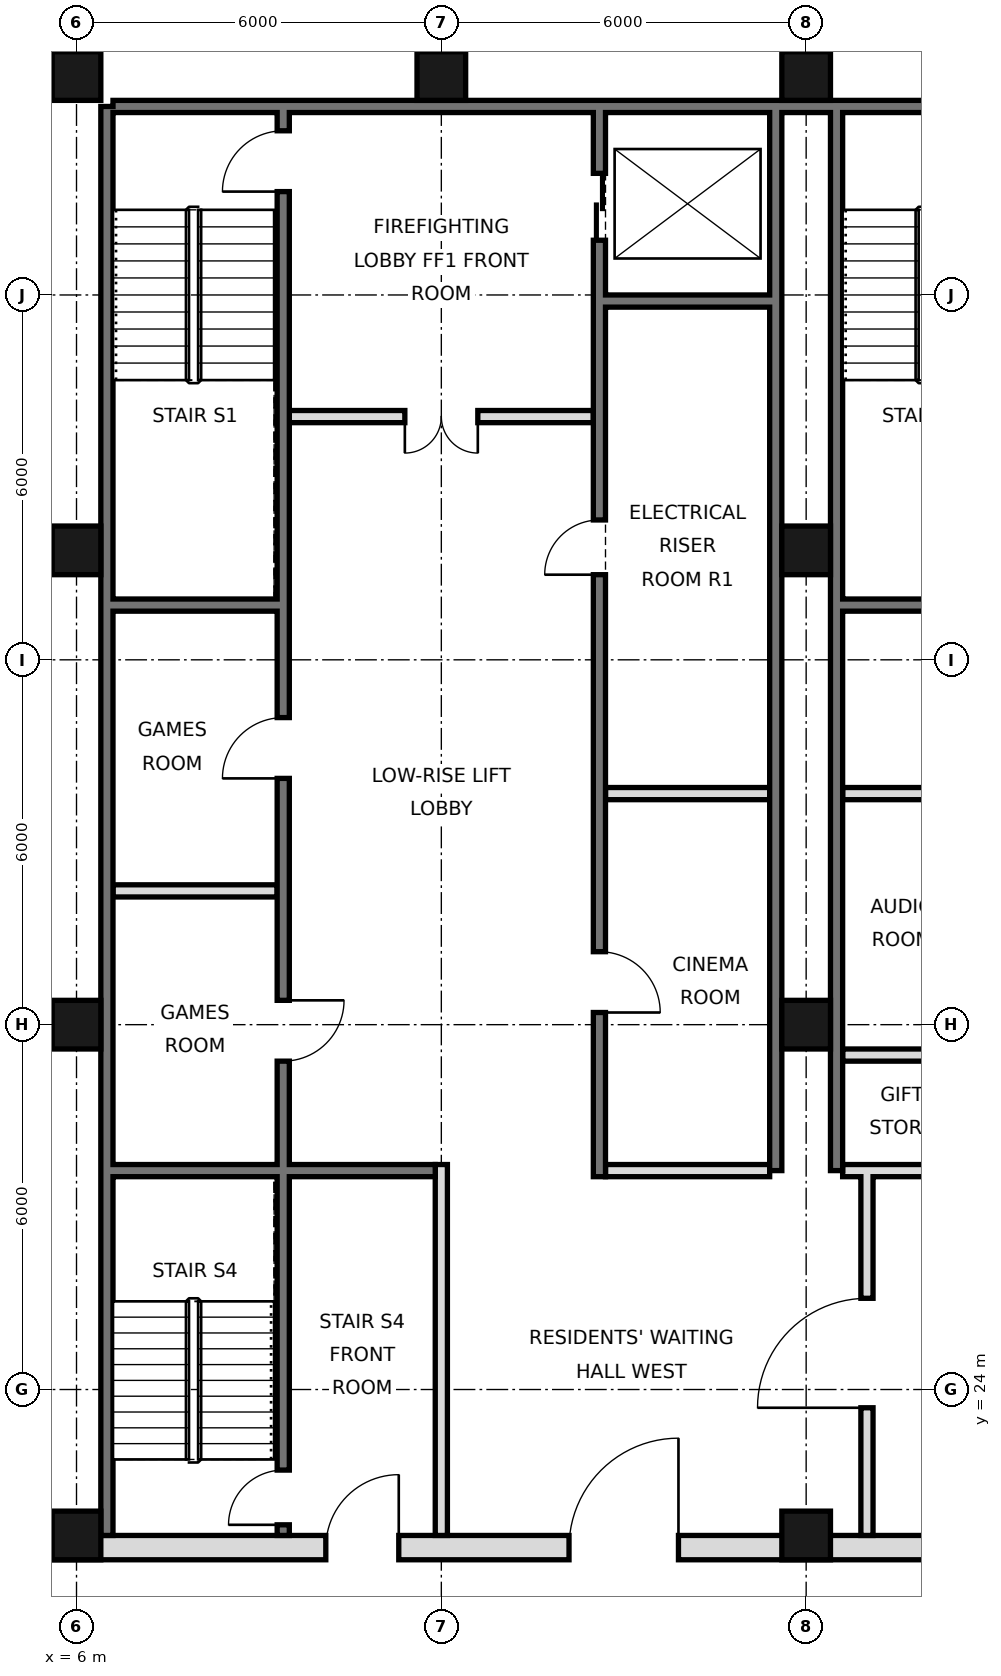
"""IFC4 building model, lengths in metres.
Left out: names, types, materials, properties, quantities, classifications, styles, units other than length and angle.
Written with IfcOpenShell. Run it as: python <this file> out.ifc"""

import sys

from ifc_helpers import new_model, si_unit, direction, frame, frame_2d, origin, origin_2d, place, context, subcontext, project, spatial, rectangle, hollow_rectangle, extrude, element, fill, save


model = new_model("IFC4")
c1 = context("Model", 3, precision=1e-05, world=origin(), true_north=direction((0.0, 1.0)))
c2 = subcontext(c1, "Body", "Model", "MODEL_VIEW")
j1 = project(units=[si_unit("LENGTHUNIT", "METRE"), si_unit("PLANEANGLEUNIT", "RADIAN")], contexts=[c1])
p1 = place(None, origin())
s1 = spatial("IfcSite", under=j1, at=p1, CompositionType="ELEMENT")
p2 = place(p1, origin())
s2 = spatial("IfcBuilding", under=s1, at=p2, CompositionType="ELEMENT")
p3 = place(p2, frame((0.0, 0.0, 312.4)))
s3 = spatial("IfcBuildingStorey", under=s2, at=p3, CompositionType="ELEMENT", Elevation=312.4)
for number, where, z_axis, x_axis in (
    (1, (6.0, 21.6, 0.0), (0.0, 0.0, 1.0), (1.0, 0.0, 0.0)),
    (2, (6.0, 30.0, 0.0), (0.0, 0.0, 1.0), (1.0, 0.0, 0.0)),
    (3, (6.0, 37.8, 0.0), (0.0, 0.0, 1.0), (1.0, 0.0, 0.0)),
    (4, (6.0, 45.6, 0.0), (0.0, 0.0, 1.0), (1.0, 0.0, 0.0)),
    (5, (12.0, 45.6, 0.0), (0.0, 0.0, 1.0), (1.0, 0.0, 0.0)),
    (6, (18.0, 21.6, 0.0), (0.0, 0.0, 1.0), (1.0, 0.0, 0.0)),
    (7, (18.0, 30.0, 0.0), (0.0, 0.0, 1.0), (1.0, 0.0, 0.0)),
    (8, (18.0, 37.8, 0.0), (0.0, 0.0, 1.0), (1.0, 0.0, 0.0)),
    (9, (18.0, 45.6, 0.0), (0.0, 0.0, 1.0), (1.0, 0.0, 0.0)),
):
    element("IfcColumn", number, at=place(p3, frame(where, z_axis=z_axis, x_axis=x_axis)), inside=s3, PredefinedType="COLUMN", context=c2, shape_type="SweptSolid", body=[
        extrude(hollow_rectangle(XDim=0.8, YDim=0.8, WallThickness=0.025, at=origin_2d()), origin(), (0.0, 0.0, 1.0), 3.6),
    ])
p4 = place(p3, frame((6.5, 21.6, 0.0), z_axis=(0.0, 0.0, 1.0), x_axis=(0.0, 1.0, 0.0)))
e10 = element("IfcWall", 10, at=p4, inside=s3, PredefinedType="SOLIDWALL", context=c2, shape_type="SweptSolid", body=[
    extrude(rectangle(XDim=23.5, YDim=0.2, at=frame_2d((11.75, 0.0))), origin(), (0.0, 0.0, 1.0), 3.42),
])
p5 = place(p3, frame((6.6, 45.1, 0.0), z_axis=(0.0, 0.0, 1.0), x_axis=(1.0, 0.0, 0.0)))
e11 = element("IfcWall", 11, at=p5, inside=s3, PredefinedType="SOLIDWALL", context=c2, shape_type="SweptSolid", body=[
    extrude(rectangle(XDim=34.8, YDim=0.2, at=frame_2d((17.4, 0.0))), origin(), (0.0, 0.0, 1.0), 3.42),
])
for number, where, z_axis, x_axis in (
    (12, (17.5, 27.6, 0.0), (0.0, 0.0, 1.0), (0.0, 1.0, 0.0)),
    (13, (18.5, 27.6, 0.0), (0.0, 0.0, 1.0), (0.0, 1.0, 0.0)),
):
    element("IfcWall", number, at=place(p3, frame(where, z_axis=z_axis, x_axis=x_axis)), inside=s3, PredefinedType="SOLIDWALL", context=c2, shape_type="SweptSolid", body=[
        extrude(rectangle(XDim=17.5, YDim=0.2, at=frame_2d((8.75, 0.0))), origin(), (0.0, 0.0, 1.0), 3.42),
    ])
p6 = place(p3, frame((5.6, 21.4, 0.0), z_axis=(0.0, 0.0, 1.0), x_axis=(1.0, 0.0, 0.0)))
e14 = element("IfcWall", 14, at=p6, inside=s3, PredefinedType="SOLIDWALL", context=c2, shape_type="SweptSolid", body=[
    extrude(rectangle(XDim=36.8, YDim=0.4, at=frame_2d((18.4, 0.0))), origin(), (0.0, 0.0, 1.0), 3.42),
])
p7 = place(p6, frame((8.5, 0.0, 0.0)))
e15 = element("IfcOpeningElement", 15, at=p7, cuts=e14, PredefinedType="OPENING", context=c2, shape_type="SweptSolid", body=[
    extrude(rectangle(XDim=1.8, YDim=2.1, at=frame_2d((0.9, 1.05))), frame((0.0, 0.21, 0.0), z_axis=(0.0, -1.0, 0.0), x_axis=(1.0, 0.0, 0.0)), (0.0, 0.0, 1.0), 0.42),
])
p8 = place(p6, frame((17.5, 0.0, 0.0)))
e16 = element("IfcOpeningElement", 16, at=p8, cuts=e14, PredefinedType="OPENING", context=c2, shape_type="SweptSolid", body=[
    extrude(rectangle(XDim=1.8, YDim=2.1, at=frame_2d((0.9, 1.05))), frame((0.0, 0.21, 0.0), z_axis=(0.0, -1.0, 0.0), x_axis=(1.0, 0.0, 0.0)), (0.0, 0.0, 1.0), 0.42),
])
p9 = place(p6, frame((26.5, 0.0, 0.0)))
e17 = element("IfcOpeningElement", 17, at=p9, cuts=e14, PredefinedType="OPENING", context=c2, shape_type="SweptSolid", body=[
    extrude(rectangle(XDim=1.8, YDim=2.1, at=frame_2d((0.9, 1.05))), frame((0.0, 0.21, 0.0), z_axis=(0.0, -1.0, 0.0), x_axis=(1.0, 0.0, 0.0)), (0.0, 0.0, 1.0), 0.42),
])
p10 = place(p6, frame((4.5, 0.0, 0.0)))
e18 = element("IfcOpeningElement", 18, at=p10, cuts=e14, PredefinedType="OPENING", context=c2, shape_type="SweptSolid", body=[
    extrude(rectangle(XDim=1.2, YDim=2.1, at=frame_2d((0.6, 1.05))), frame((0.0, 0.21, 0.0), z_axis=(0.0, -1.0, 0.0), x_axis=(1.0, 0.0, 0.0)), (0.0, 0.0, 1.0), 0.42),
])
p11 = place(p6, frame((31.1, 0.0, 0.0)))
e19 = element("IfcOpeningElement", 19, at=p11, cuts=e14, PredefinedType="OPENING", context=c2, shape_type="SweptSolid", body=[
    extrude(rectangle(XDim=1.2, YDim=2.1, at=frame_2d((0.6, 1.05))), frame((0.0, 0.21, 0.0), z_axis=(0.0, -1.0, 0.0), x_axis=(1.0, 0.0, 0.0)), (0.0, 0.0, 1.0), 0.42),
])
p12 = place(p3, frame((19.0, 21.6, 0.0), z_axis=(0.0, 0.0, 1.0), x_axis=(0.0, 1.0, 0.0)))
e20 = element("IfcWall", 20, at=p12, inside=s3, PredefinedType="PARTITIONING", context=c2, shape_type="SweptSolid", body=[
    extrude(rectangle(XDim=6.0, YDim=0.2, at=frame_2d((3.0, 0.0))), origin(), (0.0, 0.0, 1.0), 3.42),
])
p13 = place(p12, frame((2.1, 0.0, 0.0)))
e21 = element("IfcOpeningElement", 21, at=p13, cuts=e20, PredefinedType="OPENING", context=c2, shape_type="SweptSolid", body=[
    extrude(rectangle(XDim=1.8, YDim=2.1, at=frame_2d((0.9, 1.05))), frame((0.0, 0.11, 0.0), z_axis=(0.0, -1.0, 0.0), x_axis=(1.0, 0.0, 0.0)), (0.0, 0.0, 1.0), 0.22),
])
p14 = place(p3, frame((12.0, 21.6, 0.0), z_axis=(0.0, 0.0, 1.0), x_axis=(0.0, 1.0, 0.0)))
e22 = element("IfcWall", 22, at=p14, inside=s3, PredefinedType="PARTITIONING", context=c2, shape_type="SweptSolid", body=[
    extrude(rectangle(XDim=6.1, YDim=0.2, at=frame_2d((3.05, 0.0))), origin(), (0.0, 0.0, 1.0), 3.42),
])
p15 = place(p3, frame((14.6, 27.5, 0.0), z_axis=(0.0, 0.0, 1.0), x_axis=(0.0, 1.0, 0.0)))
e23 = element("IfcWall", 23, at=p15, inside=s3, PredefinedType="SOLIDWALL", context=c2, shape_type="SweptSolid", body=[
    extrude(rectangle(XDim=17.5, YDim=0.2, at=frame_2d((8.75, 0.0))), origin(), (0.0, 0.0, 1.0), 3.42),
])
p16 = place(p15, frame((15.4, 0.0, 0.0)))
e24 = element("IfcOpeningElement", 24, at=p16, cuts=e23, PredefinedType="OPENING", context=c2, shape_type="SweptSolid", body=[
    extrude(rectangle(XDim=1.1, YDim=2.1, at=frame_2d((0.55, 1.05))), frame((0.0, 0.11, 0.0), z_axis=(0.0, -1.0, 0.0), x_axis=(1.0, 0.0, 0.0)), (0.0, 0.0, 1.0), 0.22),
])
p17 = place(p15, frame((2.7, 0.0, 0.0)))
e25 = element("IfcOpeningElement", 25, at=p17, cuts=e23, PredefinedType="OPENING", context=c2, shape_type="SweptSolid", body=[
    extrude(rectangle(XDim=1.0, YDim=2.1, at=frame_2d((0.5, 1.05))), frame((0.0, 0.11, 0.0), z_axis=(0.0, -1.0, 0.0), x_axis=(1.0, 0.0, 0.0)), (0.0, 0.0, 1.0), 0.22),
])
p18 = place(p15, frame((9.9, 0.0, 0.0)))
e26 = element("IfcOpeningElement", 26, at=p18, cuts=e23, PredefinedType="OPENING", context=c2, shape_type="SweptSolid", body=[
    extrude(rectangle(XDim=0.9, YDim=2.1, at=frame_2d((0.45, 1.05))), frame((0.0, 0.11, 0.0), z_axis=(0.0, -1.0, 0.0), x_axis=(1.0, 0.0, 0.0)), (0.0, 0.0, 1.0), 0.22),
])
p19 = place(p3, frame((9.4, 21.6, 0.0), z_axis=(0.0, 0.0, 1.0), x_axis=(0.0, 1.0, 0.0)))
e27 = element("IfcWall", 27, at=p19, inside=s3, PredefinedType="SOLIDWALL", context=c2, shape_type="SweptSolid", body=[
    extrude(rectangle(XDim=23.4, YDim=0.2, at=frame_2d((11.7, 0.0))), origin(), (0.0, 0.0, 1.0), 3.42),
])
p20 = place(p19, frame((7.8, 0.0, 0.0)))
e28 = element("IfcOpeningElement", 28, at=p20, cuts=e27, PredefinedType="OPENING", context=c2, shape_type="SweptSolid", body=[
    extrude(rectangle(XDim=1.0, YDim=2.1, at=frame_2d((0.5, 1.05))), frame((0.0, 0.11, 0.0), z_axis=(0.0, -1.0, 0.0), x_axis=(1.0, 0.0, 0.0)), (0.0, 0.0, 1.0), 0.22),
])
p21 = place(p19, frame((12.45, 0.0, 0.0)))
e29 = element("IfcOpeningElement", 29, at=p21, cuts=e27, PredefinedType="OPENING", context=c2, shape_type="SweptSolid", body=[
    extrude(rectangle(XDim=1.0, YDim=2.1, at=frame_2d((0.5, 1.05))), frame((0.0, 0.11, 0.0), z_axis=(0.0, -1.0, 0.0), x_axis=(1.0, 0.0, 0.0)), (0.0, 0.0, 1.0), 0.22),
])
p22 = place(p19, frame((22.1, 0.0, 0.0)))
e30 = element("IfcOpeningElement", 30, at=p22, cuts=e27, PredefinedType="OPENING", context=c2, shape_type="SweptSolid", body=[
    extrude(rectangle(XDim=1.0, YDim=2.1, at=frame_2d((0.5, 1.05))), frame((0.0, 0.11, 0.0), z_axis=(0.0, -1.0, 0.0), x_axis=(1.0, 0.0, 0.0)), (0.0, 0.0, 1.0), 0.22),
])
p23 = place(p19, frame((0.175, 0.0, 0.0)))
e31 = element("IfcOpeningElement", 31, at=p23, cuts=e27, PredefinedType="OPENING", context=c2, shape_type="SweptSolid", body=[
    extrude(rectangle(XDim=0.9, YDim=2.1, at=frame_2d((0.45, 1.05))), frame((0.0, 0.11, 0.0), z_axis=(0.0, -1.0, 0.0), x_axis=(1.0, 0.0, 0.0)), (0.0, 0.0, 1.0), 0.22),
])
for number, where, z_axis, x_axis in (
    (32, (14.7, 27.6, 0.0), (0.0, 0.0, 1.0), (1.0, 0.0, 0.0)),
    (33, (18.6, 27.6, 0.0), (0.0, 0.0, 1.0), (1.0, 0.0, 0.0)),
):
    element("IfcWall", number, at=place(p3, frame(where, z_axis=z_axis, x_axis=x_axis)), inside=s3, PredefinedType="PARTITIONING", context=c2, shape_type="SweptSolid", body=[
        extrude(rectangle(XDim=2.7, YDim=0.2, at=frame_2d((1.35, 0.0))), origin(), (0.0, 0.0, 1.0), 3.42),
    ])
p24 = place(p3, frame((6.6, 27.6, 0.0), z_axis=(0.0, 0.0, 1.0), x_axis=(1.0, 0.0, 0.0)))
e34 = element("IfcWall", 34, at=p24, inside=s3, PredefinedType="SOLIDWALL", context=c2, shape_type="SweptSolid", body=[
    extrude(rectangle(XDim=5.3, YDim=0.2, at=frame_2d((2.65, 0.0))), origin(), (0.0, 0.0, 1.0), 3.42),
])
for number, where, z_axis, x_axis in (
    (35, (18.6, 29.5, 0.0), (0.0, 0.0, 1.0), (1.0, 0.0, 0.0)),
    (36, (6.6, 32.2, 0.0), (0.0, 0.0, 1.0), (1.0, 0.0, 0.0)),
):
    element("IfcWall", number, at=place(p3, frame(where, z_axis=z_axis, x_axis=x_axis)), inside=s3, PredefinedType="PARTITIONING", context=c2, shape_type="SweptSolid", body=[
        extrude(rectangle(XDim=2.7, YDim=0.2, at=frame_2d((1.35, 0.0))), origin(), (0.0, 0.0, 1.0), 3.42),
    ])
for number, where, z_axis, x_axis in (
    (37, (14.7, 33.8, 0.0), (0.0, 0.0, 1.0), (1.0, 0.0, 0.0)),
    (38, (18.6, 33.8, 0.0), (0.0, 0.0, 1.0), (1.0, 0.0, 0.0)),
    (39, (18.6, 36.9, 0.0), (0.0, 0.0, 1.0), (1.0, 0.0, 0.0)),
    (40, (6.6, 36.9, 0.0), (0.0, 0.0, 1.0), (1.0, 0.0, 0.0)),
):
    element("IfcWall", number, at=place(p3, frame(where, z_axis=z_axis, x_axis=x_axis)), inside=s3, PredefinedType="SOLIDWALL", context=c2, shape_type="SweptSolid", body=[
        extrude(rectangle(XDim=2.7, YDim=0.2, at=frame_2d((1.35, 0.0))), origin(), (0.0, 0.0, 1.0), 3.42),
    ])
p25 = place(p3, frame((9.5, 40.0, 0.0), z_axis=(0.0, 0.0, 1.0), x_axis=(1.0, 0.0, 0.0)))
e41 = element("IfcWall", 41, at=p25, inside=s3, PredefinedType="PARTITIONING", context=c2, shape_type="SweptSolid", body=[
    extrude(rectangle(XDim=5.0, YDim=0.2, at=frame_2d((2.5, 0.0))), origin(), (0.0, 0.0, 1.0), 3.42),
])
p26 = place(p25, frame((1.9, 0.0, 0.0)))
e42 = element("IfcOpeningElement", 42, at=p26, cuts=e41, PredefinedType="OPENING", context=c2, shape_type="SweptSolid", body=[
    extrude(rectangle(XDim=1.2, YDim=2.1, at=frame_2d((0.6, 1.05))), frame((0.0, 0.11, 0.0), z_axis=(0.0, -1.0, 0.0), x_axis=(1.0, 0.0, 0.0)), (0.0, 0.0, 1.0), 0.22),
])
p27 = place(p3, frame((14.7, 41.9, 0.0), z_axis=(0.0, 0.0, 1.0), x_axis=(1.0, 0.0, 0.0)))
e43 = element("IfcWall", 43, at=p27, inside=s3, PredefinedType="SOLIDWALL", context=c2, shape_type="SweptSolid", body=[
    extrude(rectangle(XDim=2.7, YDim=0.2, at=frame_2d((1.35, 0.0))), origin(), (0.0, 0.0, 1.0), 3.42),
])
p28 = place(p7, frame((1.8, 0.0, 0.0), z_axis=(0.0, 0.0, 1.0), x_axis=(-1.0, 0.0, 0.0)))
e44 = element("IfcDoor", 44, at=p28, inside=s3, OperationType="SINGLE_SWING_LEFT", PredefinedType="DOOR", context=c2, shape_type="SweptSolid", body=[
    extrude(rectangle(XDim=1.8, YDim=2.1, at=frame_2d((0.9, 1.05))), frame((0.0, 0.025, 0.0), z_axis=(0.0, -1.0, 0.0), x_axis=(1.0, 0.0, 0.0)), (0.0, 0.0, 1.0), 0.05),
])
fill(e15, e44)
p29 = place(p13, origin())
e45 = element("IfcDoor", 45, at=p29, inside=s3, OperationType="SINGLE_SWING_LEFT", PredefinedType="DOOR", context=c2, shape_type="SweptSolid", body=[
    extrude(rectangle(XDim=1.8, YDim=2.1, at=frame_2d((0.9, 1.05))), frame((0.0, 0.025, 0.0), z_axis=(0.0, -1.0, 0.0), x_axis=(1.0, 0.0, 0.0)), (0.0, 0.0, 1.0), 0.05),
])
fill(e21, e45)
p30 = place(p10, frame((1.2, 0.0, 0.0), z_axis=(0.0, 0.0, 1.0), x_axis=(-1.0, 0.0, 0.0)))
e46 = element("IfcDoor", 46, at=p30, inside=s3, OperationType="SINGLE_SWING_LEFT", PredefinedType="DOOR", context=c2, shape_type="SweptSolid", body=[
    extrude(rectangle(XDim=1.2, YDim=2.1, at=frame_2d((0.6, 1.05))), frame((0.0, 0.025, 0.0), z_axis=(0.0, -1.0, 0.0), x_axis=(1.0, 0.0, 0.0)), (0.0, 0.0, 1.0), 0.05),
])
fill(e18, e46)
p31 = place(p26, frame((1.2, 0.0, 0.0), z_axis=(0.0, 0.0, 1.0), x_axis=(-1.0, 0.0, 0.0)))
e47 = element("IfcDoor", 47, at=p31, inside=s3, OperationType="DOUBLE_DOOR_SINGLE_SWING", PredefinedType="DOOR", context=c2, shape_type="SweptSolid", body=[
    extrude(rectangle(XDim=1.2, YDim=2.1, at=frame_2d((0.6, 1.05))), frame((0.0, 0.025, 0.0), z_axis=(0.0, -1.0, 0.0), x_axis=(1.0, 0.0, 0.0)), (0.0, 0.0, 1.0), 0.05),
])
fill(e42, e47)
p32 = place(p16, origin())
e48 = element("IfcDoor", 48, at=p32, inside=s3, OperationType="DOUBLE_DOOR_SLIDING", PredefinedType="DOOR", context=c2, shape_type="SweptSolid", body=[
    extrude(rectangle(XDim=1.1, YDim=2.1, at=frame_2d((0.55, 1.05))), frame((0.0, 0.025, 0.0), z_axis=(0.0, -1.0, 0.0), x_axis=(1.0, 0.0, 0.0)), (0.0, 0.0, 1.0), 0.05),
])
fill(e24, e48)
p33 = place(p17, frame((1.0, 0.0, 0.0), z_axis=(0.0, 0.0, 1.0), x_axis=(-1.0, 0.0, 0.0)))
e49 = element("IfcDoor", 49, at=p33, inside=s3, OperationType="SINGLE_SWING_RIGHT", PredefinedType="DOOR", context=c2, shape_type="SweptSolid", body=[
    extrude(rectangle(XDim=1.0, YDim=2.1, at=frame_2d((0.5, 1.05))), frame((0.0, 0.025, 0.0), z_axis=(0.0, -1.0, 0.0), x_axis=(1.0, 0.0, 0.0)), (0.0, 0.0, 1.0), 0.05),
])
fill(e25, e49)
p34 = place(p20, origin())
e50 = element("IfcDoor", 50, at=p34, inside=s3, OperationType="SINGLE_SWING_RIGHT", PredefinedType="DOOR", context=c2, shape_type="SweptSolid", body=[
    extrude(rectangle(XDim=1.0, YDim=2.1, at=frame_2d((0.5, 1.05))), frame((0.0, 0.025, 0.0), z_axis=(0.0, -1.0, 0.0), x_axis=(1.0, 0.0, 0.0)), (0.0, 0.0, 1.0), 0.05),
])
fill(e28, e50)
p35 = place(p21, origin())
e51 = element("IfcDoor", 51, at=p35, inside=s3, OperationType="SINGLE_SWING_LEFT", PredefinedType="DOOR", context=c2, shape_type="SweptSolid", body=[
    extrude(rectangle(XDim=1.0, YDim=2.1, at=frame_2d((0.5, 1.05))), frame((0.0, 0.025, 0.0), z_axis=(0.0, -1.0, 0.0), x_axis=(1.0, 0.0, 0.0)), (0.0, 0.0, 1.0), 0.05),
])
fill(e29, e51)
p36 = place(p22, origin())
e52 = element("IfcDoor", 52, at=p36, inside=s3, OperationType="SINGLE_SWING_LEFT", PredefinedType="DOOR", context=c2, shape_type="SweptSolid", body=[
    extrude(rectangle(XDim=1.0, YDim=2.1, at=frame_2d((0.5, 1.05))), frame((0.0, 0.025, 0.0), z_axis=(0.0, -1.0, 0.0), x_axis=(1.0, 0.0, 0.0)), (0.0, 0.0, 1.0), 0.05),
])
fill(e30, e52)
p37 = place(p23, origin())
e53 = element("IfcDoor", 53, at=p37, inside=s3, OperationType="SINGLE_SWING_LEFT", PredefinedType="DOOR", context=c2, shape_type="SweptSolid", body=[
    extrude(rectangle(XDim=0.9, YDim=2.1, at=frame_2d((0.45, 1.05))), frame((0.0, 0.025, 0.0), z_axis=(0.0, -1.0, 0.0), x_axis=(1.0, 0.0, 0.0)), (0.0, 0.0, 1.0), 0.05),
])
fill(e31, e53)
p38 = place(p18, origin())
e54 = element("IfcDoor", 54, at=p38, inside=s3, OperationType="SINGLE_SWING_LEFT", PredefinedType="DOOR", context=c2, shape_type="SweptSolid", body=[
    extrude(rectangle(XDim=0.9, YDim=2.1, at=frame_2d((0.45, 1.05))), frame((0.0, 0.025, 0.0), z_axis=(0.0, -1.0, 0.0), x_axis=(1.0, 0.0, 0.0)), (0.0, 0.0, 1.0), 0.05),
])
fill(e26, e54)
save(model, sys.argv[1])
